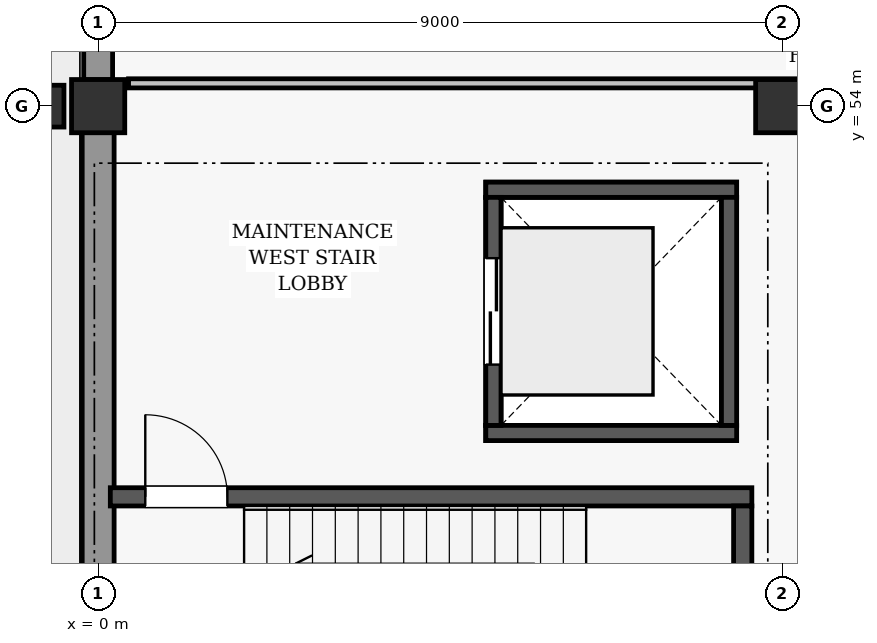
"""IFC4 building model, lengths in metres.
Left out: names, types, materials, properties, quantities, classifications, styles, units other than length and angle.
Written with IfcOpenShell. Run it as: python <this file> out.ifc"""

import sys

from ifc_helpers import new_model, si_unit, direction, frame, frame_2d, origin, origin_2d, place, context, subcontext, project, spatial, rectangle, extrude, element, fill, save


model = new_model("IFC4")
c1 = context("Model", 3, precision=1e-05, world=origin(), true_north=direction((0.0, 1.0)))
c2 = subcontext(c1, "Body", "Model", "MODEL_VIEW")
j1 = project(units=[si_unit("LENGTHUNIT", "METRE"), si_unit("PLANEANGLEUNIT", "RADIAN")], contexts=[c1])
p1 = place(None, origin())
s1 = spatial("IfcSite", under=j1, at=p1, CompositionType="ELEMENT")
p2 = place(p1, origin())
s2 = spatial("IfcBuilding", under=s1, at=p2, CompositionType="ELEMENT")
p3 = place(p2, origin())
s3 = spatial("IfcBuildingStorey", under=s2, at=p3, CompositionType="ELEMENT", Elevation=0.0)
for number, where, z_axis, x_axis in (
    (1, (0.0, 54.0, 0.0), (0.0, 0.0, 1.0), (1.0, 0.0, 0.0)),
    (2, (9.0, 54.0, 0.0), (0.0, 0.0, 1.0), (1.0, 0.0, 0.0)),
):
    element("IfcColumn", number, at=place(p3, frame(where, z_axis=z_axis, x_axis=x_axis)), inside=s3, PredefinedType="COLUMN", context=c2, shape_type="SweptSolid", body=[
        extrude(rectangle(XDim=0.7, YDim=0.7, at=origin_2d()), origin(), (0.0, 0.0, 1.0), 4.8),
    ])
p4 = place(p3, frame((-0.85, 54.0, 0.0), z_axis=(0.0, 0.0, 1.0), x_axis=(0.0, 1.0, 0.0)))
e3 = element("IfcColumn", 3, at=p4, inside=s3, PredefinedType="PILASTER", context=c2, shape_type="SweptSolid", body=[
    extrude(rectangle(XDim=0.55, YDim=0.8, at=origin_2d()), origin(), (0.0, 0.0, 1.0), 4.8),
])
p5 = place(p3, frame((0.0, 45.323, 0.0), z_axis=(0.0, 0.0, 1.0), x_axis=(0.0, 1.0, 0.0)))
e4 = element("IfcWall", 4, at=p5, inside=s3, PredefinedType="SOLIDWALL", context=c2, shape_type="SweptSolid", body=[
    extrude(rectangle(XDim=8.329, YDim=0.42, at=frame_2d((4.165, 0.0))), origin(), (0.0, 0.0, 1.0), 4.012),
])
p6 = place(p5, frame((1.257, 0.0, 0.0)))
e5 = element("IfcOpeningElement", 5, at=p6, cuts=e4, PredefinedType="OPENING", context=c2, shape_type="SweptSolid", body=[
    extrude(rectangle(XDim=1.12, YDim=2.14, at=frame_2d((0.56, 1.07))), frame((0.0, 0.22, 0.0), z_axis=(0.0, -1.0, 0.0), x_axis=(1.0, 0.0, 0.0)), (0.0, 0.0, 1.0), 0.44),
])
p7 = place(p3, frame((0.0, 54.348, 0.0), z_axis=(0.0, 0.0, 1.0), x_axis=(0.0, 1.0, 0.0)))
e6 = element("IfcWall", 6, at=p7, inside=s3, PredefinedType="SOLIDWALL", context=c2, shape_type="SweptSolid", body=[
    extrude(rectangle(XDim=8.329, YDim=0.38, at=frame_2d((4.165, 0.0))), origin(), (0.0, 0.0, 1.0), 4.012),
])
p8 = place(p7, frame((1.856, 0.0, 0.85)))
e7 = element("IfcOpeningElement", 7, at=p8, cuts=e6, PredefinedType="OPENING", context=c2, shape_type="SweptSolid", body=[
    extrude(rectangle(XDim=1.38, YDim=1.52, at=frame_2d((0.69, 0.76))), frame((0.0, 0.2, 0.0), z_axis=(0.0, -1.0, 0.0), x_axis=(1.0, 0.0, 0.0)), (0.0, 0.0, 1.0), 0.4),
])
p9 = place(p7, frame((5.093, 0.0, 0.85)))
e8 = element("IfcOpeningElement", 8, at=p9, cuts=e6, PredefinedType="OPENING", context=c2, shape_type="SweptSolid", body=[
    extrude(rectangle(XDim=1.38, YDim=1.52, at=frame_2d((0.69, 0.76))), frame((0.0, 0.2, 0.0), z_axis=(0.0, -1.0, 0.0), x_axis=(1.0, 0.0, 0.0)), (0.0, 0.0, 1.0), 0.4),
])
p10 = place(p3, frame((0.16, 48.86, 0.0), z_axis=(0.0, 0.0, 1.0), x_axis=(1.0, 0.0, 0.0)))
e9 = element("IfcWall", 9, at=p10, inside=s3, PredefinedType="SHEAR", context=c2, shape_type="SweptSolid", body=[
    extrude(rectangle(XDim=8.44, YDim=0.24, at=frame_2d((4.22, 0.0))), origin(), (0.0, 0.0, 1.0), 4.55),
])
p11 = place(p10, frame((0.46, 0.0, 0.0)))
e10 = element("IfcOpeningElement", 10, at=p11, cuts=e9, PredefinedType="OPENING", context=c2, shape_type="SweptSolid", body=[
    extrude(rectangle(XDim=1.08, YDim=2.08, at=frame_2d((0.54, 1.04))), frame((0.0, 0.13, 0.0), z_axis=(0.0, -1.0, 0.0), x_axis=(1.0, 0.0, 0.0)), (0.0, 0.0, 1.0), 0.26),
])
p12 = place(p3, frame((8.48, 45.55, 0.0), z_axis=(0.0, 0.0, 1.0), x_axis=(0.0, 1.0, 0.0)))
e11 = element("IfcWall", 11, at=p12, inside=s3, PredefinedType="SHEAR", context=c2, shape_type="SweptSolid", body=[
    extrude(rectangle(XDim=3.19, YDim=0.24, at=frame_2d((1.595, 0.0))), origin(), (0.0, 0.0, 1.0), 4.55),
])
for number, where, z_axis, x_axis in (
    (12, (5.1, 49.7, -1.4), (0.0, 0.0, 1.0), (1.0, 0.0, 0.0)),
    (13, (5.1, 52.9, -1.4), (0.0, 0.0, 1.0), (1.0, 0.0, 0.0)),
):
    element("IfcWall", number, at=place(p3, frame(where, z_axis=z_axis, x_axis=x_axis)), inside=s3, PredefinedType="SHEAR", context=c2, shape_type="SweptSolid", body=[
        extrude(rectangle(XDim=3.3, YDim=0.2, at=frame_2d((1.65, 0.0))), origin(), (0.0, 0.0, 1.0), 1.1),
    ])
for number, where, z_axis, x_axis in (
    (14, (5.2, 49.8, -1.4), (0.0, 0.0, 1.0), (0.0, 1.0, 0.0)),
    (15, (8.3, 49.8, -1.4), (0.0, 0.0, 1.0), (0.0, 1.0, 0.0)),
):
    element("IfcWall", number, at=place(p3, frame(where, z_axis=z_axis, x_axis=x_axis)), inside=s3, PredefinedType="SHEAR", context=c2, shape_type="SweptSolid", body=[
        extrude(rectangle(XDim=3.0, YDim=0.2, at=frame_2d((1.5, 0.0))), origin(), (0.0, 0.0, 1.0), 1.1),
    ])
for number, where, z_axis, x_axis in (
    (16, (5.1, 49.7, 0.0), (0.0, 0.0, 1.0), (1.0, 0.0, 0.0)),
    (17, (5.1, 52.9, 0.0), (0.0, 0.0, 1.0), (1.0, 0.0, 0.0)),
):
    element("IfcWall", number, at=place(p3, frame(where, z_axis=z_axis, x_axis=x_axis)), inside=s3, PredefinedType="SHEAR", context=c2, shape_type="SweptSolid", body=[
        extrude(rectangle(XDim=3.3, YDim=0.2, at=frame_2d((1.65, 0.0))), origin(), (0.0, 0.0, 1.0), 4.55),
    ])
p13 = place(p3, frame((5.2, 49.8, 0.0), z_axis=(0.0, 0.0, 1.0), x_axis=(0.0, 1.0, 0.0)))
e18 = element("IfcWall", 18, at=p13, inside=s3, PredefinedType="SHEAR", context=c2, shape_type="SweptSolid", body=[
    extrude(rectangle(XDim=3.0, YDim=0.2, at=frame_2d((1.5, 0.0))), origin(), (0.0, 0.0, 1.0), 4.55),
])
p14 = place(p13, frame((0.8, 0.0, 0.0)))
e19 = element("IfcOpeningElement", 19, at=p14, cuts=e18, PredefinedType="OPENING", context=c2, shape_type="SweptSolid", body=[
    extrude(rectangle(XDim=1.4, YDim=2.15, at=frame_2d((0.7, 1.075))), frame((0.0, 0.11, 0.0), z_axis=(0.0, -1.0, 0.0), x_axis=(1.0, 0.0, 0.0)), (0.0, 0.0, 1.0), 0.22),
])
p15 = place(p3, frame((8.3, 49.8, 0.0), z_axis=(0.0, 0.0, 1.0), x_axis=(0.0, 1.0, 0.0)))
e20 = element("IfcWall", 20, at=p15, inside=s3, PredefinedType="SHEAR", context=c2, shape_type="SweptSolid", body=[
    extrude(rectangle(XDim=3.0, YDim=0.2, at=frame_2d((1.5, 0.0))), origin(), (0.0, 0.0, 1.0), 4.55),
])
p16 = place(p3, frame((0.4, 54.3, 0.0), z_axis=(0.0, 0.0, 1.0), x_axis=(1.0, 0.0, 0.0)))
e21 = element("IfcWall", 21, at=p16, inside=s3, PredefinedType="PARTITIONING", context=c2, shape_type="SweptSolid", body=[
    extrude(rectangle(XDim=62.2, YDim=0.12, at=frame_2d((31.1, 0.0))), origin(), (0.0, 0.0, 1.0), 3.565),
])
p17 = place(p16, frame((21.29, 0.0, 0.0)))
e22 = element("IfcOpeningElement", 22, at=p17, cuts=e21, PredefinedType="OPENING", context=c2, shape_type="SweptSolid", body=[
    extrude(rectangle(XDim=1.62, YDim=2.14, at=frame_2d((0.81, 1.07))), frame((0.0, 0.07, 0.0), z_axis=(0.0, -1.0, 0.0), x_axis=(1.0, 0.0, 0.0)), (0.0, 0.0, 1.0), 0.14),
])
p18 = place(p11, origin())
e23 = element("IfcDoor", 23, at=p18, inside=s3, OperationType="SINGLE_SWING_LEFT", PredefinedType="DOOR", context=c2, shape_type="SweptSolid", body=[
    extrude(rectangle(XDim=1.08, YDim=2.08, at=frame_2d((0.54, 1.04))), frame((0.0, 0.025, 0.0), z_axis=(0.0, -1.0, 0.0), x_axis=(1.0, 0.0, 0.0)), (0.0, 0.0, 1.0), 0.05),
])
fill(e10, e23)
p19 = place(p14, origin())
e24 = element("IfcDoor", 24, at=p19, inside=s3, OperationType="DOUBLE_DOOR_SLIDING", PredefinedType="DOOR", context=c2, shape_type="SweptSolid", body=[
    extrude(rectangle(XDim=1.4, YDim=2.15, at=frame_2d((0.7, 1.075))), frame((0.0, 0.025, 0.0), z_axis=(0.0, -1.0, 0.0), x_axis=(1.0, 0.0, 0.0)), (0.0, 0.0, 1.0), 0.05),
])
fill(e19, e24)
save(model, sys.argv[1])
